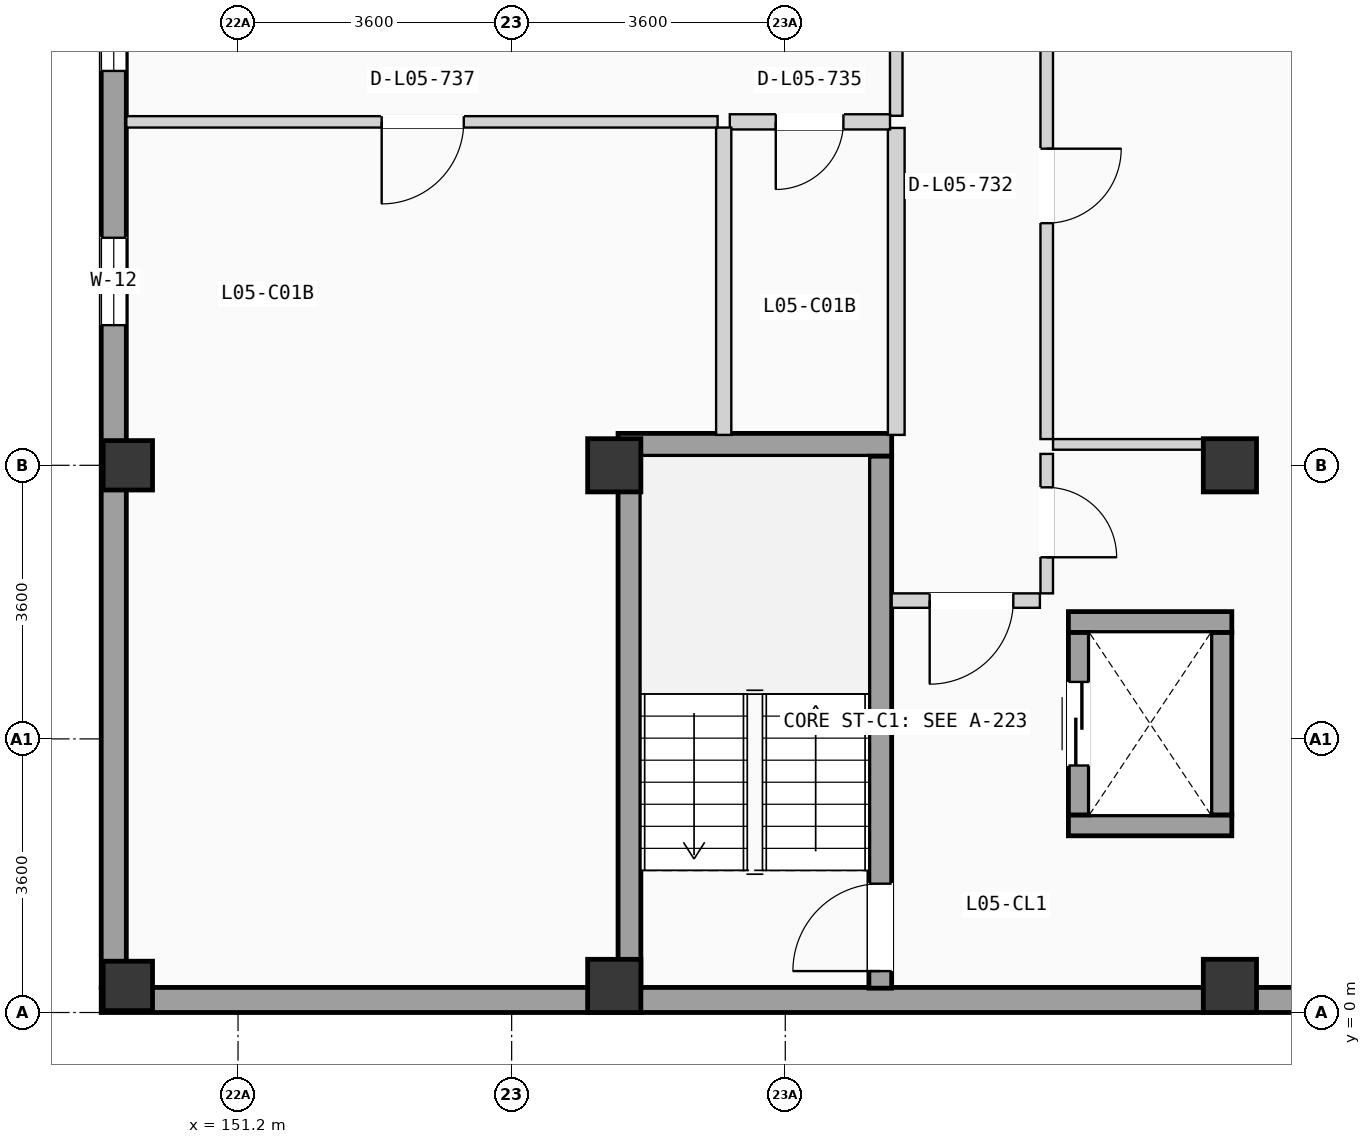
"""IFC4 building model, lengths in metres.
Left out: names, types, materials, properties, quantities, classifications, styles, units other than length and angle.
Written with IfcOpenShell. Run it as: python <this file> out.ifc"""

import sys

from ifc_helpers import new_model, si_unit, direction, frame, frame_2d, origin, origin_2d, place, context, subcontext, project, spatial, rectangle, extrude, element, fill, save


model = new_model("IFC4")
c1 = context("Model", 3, precision=1e-05, world=origin(), true_north=direction((0.0, 1.0)))
c2 = subcontext(c1, "Body", "Model", "MODEL_VIEW")
j1 = project(units=[si_unit("LENGTHUNIT", "METRE"), si_unit("PLANEANGLEUNIT", "RADIAN")], contexts=[c1])
p1 = place(None, origin())
s1 = spatial("IfcSite", under=j1, at=p1, CompositionType="ELEMENT")
p2 = place(p1, origin())
s2 = spatial("IfcBuilding", under=s1, at=p2, CompositionType="ELEMENT")
p3 = place(p2, frame((0.0, 0.0, 18.375)))
s3 = spatial("IfcBuildingStorey", under=s2, at=p3, CompositionType="ELEMENT", Elevation=18.375)
for number, where, z_axis, x_axis in (
    (1, (149.75, 0.35, 0.0), (0.0, 0.0, 1.0), (1.0, 0.0, 0.0)),
    (2, (149.75, 7.2, 0.0), (0.0, 0.0, 1.0), (1.0, 0.0, 0.0)),
):
    element("IfcColumn", number, at=place(p3, frame(where, z_axis=z_axis, x_axis=x_axis)), inside=s3, PredefinedType="COLUMN", context=c2, shape_type="SweptSolid", body=[
        extrude(rectangle(XDim=0.65, YDim=0.65, at=origin_2d()), origin(), (0.0, 0.0, 1.0), 3.15),
    ])
for number, where, z_axis, x_axis in (
    (3, (156.15, 0.35, 0.0), (0.0, 0.0, 1.0), (1.0, 0.0, 0.0)),
    (4, (156.15, 7.2, 0.0), (0.0, 0.0, 1.0), (1.0, 0.0, 0.0)),
    (5, (164.25, 0.35, 0.0), (0.0, 0.0, 1.0), (1.0, 0.0, 0.0)),
    (6, (164.25, 7.2, 0.0), (0.0, 0.0, 1.0), (1.0, 0.0, 0.0)),
):
    element("IfcColumn", number, at=place(p3, frame(where, z_axis=z_axis, x_axis=x_axis)), inside=s3, PredefinedType="COLUMN", context=c2, shape_type="SweptSolid", body=[
        extrude(rectangle(XDim=0.7, YDim=0.7, at=origin_2d()), origin(), (0.0, 0.0, 1.0), 3.15),
    ])
p4 = place(p3, frame((149.4, 0.165, 0.0), z_axis=(0.0, 0.0, 1.0), x_axis=(1.0, 0.0, 0.0)))
e7 = element("IfcWall", 7, at=p4, inside=s3, PredefinedType="SOLIDWALL", context=c2, shape_type="SweptSolid", body=[
    extrude(rectangle(XDim=21.6, YDim=0.33, at=frame_2d((10.8, 0.0))), origin(), (0.0, 0.0, 1.0), 2.89),
])
p5 = place(p3, frame((149.565, 0.33, 0.0), z_axis=(0.0, 0.0, 1.0), x_axis=(0.0, 1.0, 0.0)))
e8 = element("IfcWall", 8, at=p5, inside=s3, PredefinedType="SOLIDWALL", context=c2, shape_type="SweptSolid", body=[
    extrude(rectangle(XDim=49.74, YDim=0.33, at=frame_2d((24.87, 0.0))), origin(), (0.0, 0.0, 1.0), 2.89),
])
p6 = place(p5, frame((12.059, 0.0, 0.9)))
e9 = element("IfcOpeningElement", 9, at=p6, cuts=e8, PredefinedType="OPENING", context=c2, shape_type="SweptSolid", body=[
    extrude(rectangle(XDim=1.15, YDim=1.2, at=frame_2d((0.575, 0.6))), frame((0.0, 0.175, 0.0), z_axis=(0.0, -1.0, 0.0), x_axis=(1.0, 0.0, 0.0)), (0.0, 0.0, 1.0), 0.35),
])
p7 = place(p5, frame((8.714, 0.0, 0.855)))
e10 = element("IfcOpeningElement", 10, at=p7, cuts=e8, PredefinedType="OPENING", context=c2, shape_type="SweptSolid", body=[
    extrude(rectangle(XDim=1.15, YDim=1.35, at=frame_2d((0.575, 0.675))), frame((0.0, 0.175, 0.0), z_axis=(0.0, -1.0, 0.0), x_axis=(1.0, 0.0, 0.0)), (0.0, 0.0, 1.0), 0.35),
])
p8 = place(p5, frame((17.962, 0.0, 0.705)))
e11 = element("IfcOpeningElement", 11, at=p8, cuts=e8, PredefinedType="OPENING", context=c2, shape_type="SweptSolid", body=[
    extrude(rectangle(XDim=1.15, YDim=1.5, at=frame_2d((0.575, 0.75))), frame((0.0, 0.175, 0.0), z_axis=(0.0, -1.0, 0.0), x_axis=(1.0, 0.0, 0.0)), (0.0, 0.0, 1.0), 0.35),
])
p9 = place(p5, frame((31.115, 0.0, 0.555)))
e12 = element("IfcOpeningElement", 12, at=p9, cuts=e8, PredefinedType="OPENING", context=c2, shape_type="SweptSolid", body=[
    extrude(rectangle(XDim=1.15, YDim=1.65, at=frame_2d((0.575, 0.825))), frame((0.0, 0.175, 0.0), z_axis=(0.0, -1.0, 0.0), x_axis=(1.0, 0.0, 0.0)), (0.0, 0.0, 1.0), 0.35),
])
p10 = place(p5, frame((23.992, 0.0, 0.85)))
e13 = element("IfcOpeningElement", 13, at=p10, cuts=e8, PredefinedType="OPENING", context=c2, shape_type="SweptSolid", body=[
    extrude(rectangle(XDim=0.95, YDim=1.2, at=frame_2d((0.475, 0.6))), frame((0.0, 0.175, 0.0), z_axis=(0.0, -1.0, 0.0), x_axis=(1.0, 0.0, 0.0)), (0.0, 0.0, 1.0), 0.35),
])
p11 = place(p5, frame((38.58, 0.0, 0.9)))
e14 = element("IfcOpeningElement", 14, at=p11, cuts=e8, PredefinedType="OPENING", context=c2, shape_type="SweptSolid", body=[
    extrude(rectangle(XDim=1.25, YDim=1.2, at=frame_2d((0.625, 0.6))), frame((0.0, 0.175, 0.0), z_axis=(0.0, -1.0, 0.0), x_axis=(1.0, 0.0, 0.0)), (0.0, 0.0, 1.0), 0.35),
])
p12 = place(p3, frame((156.2, 7.47, 0.0), z_axis=(0.0, 0.0, 1.0), x_axis=(1.0, 0.0, 0.0)))
e15 = element("IfcWall", 15, at=p12, inside=s3, PredefinedType="SHEAR", context=c2, shape_type="SweptSolid", body=[
    extrude(rectangle(XDim=3.6, YDim=0.3, at=frame_2d((1.8, 0.0))), origin(), (0.0, 0.0, 1.0), 2.89),
])
p13 = place(p3, frame((156.35, 0.32, 0.0), z_axis=(0.0, 0.0, 1.0), x_axis=(0.0, 1.0, 0.0)))
e16 = element("IfcWall", 16, at=p13, inside=s3, PredefinedType="SHEAR", context=c2, shape_type="SweptSolid", body=[
    extrude(rectangle(XDim=7.0, YDim=0.3, at=frame_2d((3.5, 0.0))), origin(), (0.0, 0.0, 1.0), 2.89),
])
p14 = place(p3, frame((159.65, 0.32, 0.0), z_axis=(0.0, 0.0, 1.0), x_axis=(0.0, 1.0, 0.0)))
e17 = element("IfcWall", 17, at=p14, inside=s3, PredefinedType="SHEAR", context=c2, shape_type="SweptSolid", body=[
    extrude(rectangle(XDim=7.0, YDim=0.3, at=frame_2d((3.5, 0.0))), origin(), (0.0, 0.0, 1.0), 2.89),
])
p15 = place(p14, frame((0.225, 0.0, 0.0)))
e18 = element("IfcOpeningElement", 18, at=p15, cuts=e17, PredefinedType="OPENING", context=c2, shape_type="SweptSolid", body=[
    extrude(rectangle(XDim=1.15, YDim=2.12, at=frame_2d((0.575, 1.06))), frame((0.0, 0.16, 0.0), z_axis=(0.0, -1.0, 0.0), x_axis=(1.0, 0.0, 0.0)), (0.0, 0.0, 1.0), 0.32),
])
for number, where, z_axis, x_axis in (
    (19, (162.125, 2.462, 0.0), (0.0, 0.0, 1.0), (1.0, 0.0, 0.0)),
    (20, (162.125, 5.137, 0.0), (0.0, 0.0, 1.0), (1.0, 0.0, 0.0)),
):
    element("IfcWall", number, at=place(p3, frame(where, z_axis=z_axis, x_axis=x_axis)), inside=s3, PredefinedType="SHEAR", context=c2, shape_type="SweptSolid", body=[
        extrude(rectangle(XDim=2.15, YDim=0.275, at=frame_2d((1.075, 0.0))), origin(), (0.0, 0.0, 1.0), 2.89),
    ])
p16 = place(p3, frame((162.262, 2.6, 0.0), z_axis=(0.0, 0.0, 1.0), x_axis=(0.0, 1.0, 0.0)))
e21 = element("IfcWall", 21, at=p16, inside=s3, PredefinedType="SHEAR", context=c2, shape_type="SweptSolid", body=[
    extrude(rectangle(XDim=2.4, YDim=0.275, at=frame_2d((1.2, 0.0))), origin(), (0.0, 0.0, 1.0), 2.89),
])
p17 = place(p16, frame((0.65, 0.0, 0.0)))
e22 = element("IfcOpeningElement", 22, at=p17, cuts=e21, PredefinedType="OPENING", context=c2, shape_type="SweptSolid", body=[
    extrude(rectangle(XDim=1.1, YDim=2.15, at=frame_2d((0.55, 1.075))), frame((0.0, 0.147, 0.0), z_axis=(0.0, -1.0, 0.0), x_axis=(1.0, 0.0, 0.0)), (0.0, 0.0, 1.0), 0.295),
])
p18 = place(p3, frame((164.137, 2.6, 0.0), z_axis=(0.0, 0.0, 1.0), x_axis=(0.0, 1.0, 0.0)))
e23 = element("IfcWall", 23, at=p18, inside=s3, PredefinedType="SHEAR", context=c2, shape_type="SweptSolid", body=[
    extrude(rectangle(XDim=2.4, YDim=0.275, at=frame_2d((1.2, 0.0))), origin(), (0.0, 0.0, 1.0), 2.89),
])
p19 = place(p3, frame((159.8, 5.42, 0.0), z_axis=(0.0, 0.0, 1.0), x_axis=(1.0, 0.0, 0.0)))
e24 = element("IfcWall", 24, at=p19, inside=s3, PredefinedType="PARTITIONING", context=c2, shape_type="SweptSolid", body=[
    extrude(rectangle(XDim=1.95, YDim=0.19, at=frame_2d((0.975, 0.0))), origin(), (0.0, 0.0, 1.0), 2.87),
])
p20 = place(p19, frame((0.5, 0.0, 0.0)))
e25 = element("IfcOpeningElement", 25, at=p20, cuts=e24, PredefinedType="OPENING", context=c2, shape_type="SweptSolid", body=[
    extrude(rectangle(XDim=1.1, YDim=2.12, at=frame_2d((0.55, 1.06))), frame((0.0, 0.105, 0.0), z_axis=(0.0, -1.0, 0.0), x_axis=(1.0, 0.0, 0.0)), (0.0, 0.0, 1.0), 0.21),
])
p21 = place(p3, frame((161.84, 5.515, 0.0), z_axis=(0.0, 0.0, 1.0), x_axis=(0.0, 1.0, 0.0)))
e26 = element("IfcWall", 26, at=p21, inside=s3, PredefinedType="PARTITIONING", context=c2, shape_type="SweptSolid", body=[
    extrude(rectangle(XDim=1.835, YDim=0.165, at=frame_2d((0.917, 0.0))), origin(), (0.0, 0.0, 1.0), 2.87),
])
p22 = place(p21, frame((0.475, 0.0, 0.0)))
e27 = element("IfcOpeningElement", 27, at=p22, cuts=e26, PredefinedType="OPENING", context=c2, shape_type="SweptSolid", body=[
    extrude(rectangle(XDim=0.92, YDim=2.04, at=frame_2d((0.46, 1.02))), frame((0.0, 0.093, 0.0), z_axis=(0.0, -1.0, 0.0), x_axis=(1.0, 0.0, 0.0)), (0.0, 0.0, 1.0), 0.185),
])
p23 = place(p3, frame((161.923, 7.475, 0.0), z_axis=(0.0, 0.0, 1.0), x_axis=(1.0, 0.0, 0.0)))
e28 = element("IfcWall", 28, at=p23, inside=s3, PredefinedType="PARTITIONING", context=c2, shape_type="SweptSolid", body=[
    extrude(rectangle(XDim=2.127, YDim=0.14, at=frame_2d((1.063, 0.0))), origin(), (0.0, 0.0, 1.0), 2.87),
])
p24 = place(p3, frame((159.86, 11.799, 0.0), z_axis=(0.0, 0.0, 1.0), x_axis=(0.0, 1.0, 0.0)))
e29 = element("IfcWall", 29, at=p24, inside=s3, PredefinedType="PARTITIONING", context=c2, shape_type="SweptSolid", body=[
    extrude(rectangle(XDim=4.888, YDim=0.165, at=frame_2d((2.444, 0.0))), origin(), (0.0, 0.0, 1.0), 2.87),
])
p25 = place(p24, frame((1.939, 0.0, 0.0)))
e30 = element("IfcOpeningElement", 30, at=p25, cuts=e29, PredefinedType="OPENING", context=c2, shape_type="SweptSolid", body=[
    extrude(rectangle(XDim=1.01, YDim=2.11, at=frame_2d((0.505, 1.055))), frame((0.0, 0.093, 0.0), z_axis=(0.0, -1.0, 0.0), x_axis=(1.0, 0.0, 0.0)), (0.0, 0.0, 1.0), 0.185),
])
p26 = place(p3, frame((159.86, 7.6, 0.0), z_axis=(0.0, 0.0, 1.0), x_axis=(0.0, 1.0, 0.0)))
e31 = element("IfcWall", 31, at=p26, inside=s3, PredefinedType="PLUMBINGWALL", context=c2, shape_type="SweptSolid", body=[
    extrude(rectangle(XDim=4.039, YDim=0.22, at=frame_2d((2.02, 0.0))), origin(), (0.0, 0.0, 1.0), 2.87),
])
p27 = place(p3, frame((161.84, 7.545, 0.0), z_axis=(0.0, 0.0, 1.0), x_axis=(0.0, 1.0, 0.0)))
e32 = element("IfcWall", 32, at=p27, inside=s3, PredefinedType="PARTITIONING", context=c2, shape_type="SweptSolid", body=[
    extrude(rectangle(XDim=6.608, YDim=0.165, at=frame_2d((3.304, 0.0))), origin(), (0.0, 0.0, 1.0), 2.87),
])
p28 = place(p27, frame((2.841, 0.0, 0.0)))
e33 = element("IfcOpeningElement", 33, at=p28, cuts=e32, PredefinedType="OPENING", context=c2, shape_type="SweptSolid", body=[
    extrude(rectangle(XDim=0.98, YDim=2.08, at=frame_2d((0.49, 1.04))), frame((0.0, 0.093, 0.0), z_axis=(0.0, -1.0, 0.0), x_axis=(1.0, 0.0, 0.0)), (0.0, 0.0, 1.0), 0.185),
])
p29 = place(p3, frame((157.67, 11.719, 0.0), z_axis=(0.0, 0.0, 1.0), x_axis=(1.0, 0.0, 0.0)))
e34 = element("IfcWall", 34, at=p29, inside=s3, PredefinedType="PLUMBINGWALL", context=c2, shape_type="SweptSolid", body=[
    extrude(rectangle(XDim=2.108, YDim=0.2, at=frame_2d((1.054, 0.0))), origin(), (0.0, 0.0, 1.0), 2.87),
])
p30 = place(p29, frame((0.605, 0.0, 0.0)))
e35 = element("IfcOpeningElement", 35, at=p30, cuts=e34, PredefinedType="OPENING", context=c2, shape_type="SweptSolid", body=[
    extrude(rectangle(XDim=0.89, YDim=2.03, at=frame_2d((0.445, 1.015))), frame((0.0, 0.11, 0.0), z_axis=(0.0, -1.0, 0.0), x_axis=(1.0, 0.0, 0.0)), (0.0, 0.0, 1.0), 0.22),
])
p31 = place(p3, frame((149.73, 11.719, 0.0), z_axis=(0.0, 0.0, 1.0), x_axis=(1.0, 0.0, 0.0)))
e36 = element("IfcWall", 36, at=p31, inside=s3, PredefinedType="PARTITIONING", context=c2, shape_type="SweptSolid", body=[
    extrude(rectangle(XDim=7.78, YDim=0.15, at=frame_2d((3.89, 0.0))), origin(), (0.0, 0.0, 1.0), 2.87),
])
p32 = place(p31, frame((3.36, 0.0, 0.0)))
e37 = element("IfcOpeningElement", 37, at=p32, cuts=e36, PredefinedType="OPENING", context=c2, shape_type="SweptSolid", body=[
    extrude(rectangle(XDim=1.08, YDim=2.1, at=frame_2d((0.54, 1.05))), frame((0.0, 0.085, 0.0), z_axis=(0.0, -1.0, 0.0), x_axis=(1.0, 0.0, 0.0)), (0.0, 0.0, 1.0), 0.17),
])
p33 = place(p3, frame((157.59, 7.6, 0.0), z_axis=(0.0, 0.0, 1.0), x_axis=(0.0, 1.0, 0.0)))
e38 = element("IfcWall", 38, at=p33, inside=s3, PredefinedType="PLUMBINGWALL", context=c2, shape_type="SweptSolid", body=[
    extrude(rectangle(XDim=4.044, YDim=0.2, at=frame_2d((2.022, 0.0))), origin(), (0.0, 0.0, 1.0), 2.87),
])
p34 = place(p6, origin())
e39 = element("IfcWindow", 39, at=p34, inside=s3, PartitioningType="SINGLE_PANEL", PredefinedType="WINDOW", context=c2, shape_type="SweptSolid", body=[
    extrude(rectangle(XDim=1.15, YDim=1.2, at=frame_2d((0.575, 0.6))), frame((0.0, 0.03, 0.0), z_axis=(0.0, -1.0, 0.0), x_axis=(1.0, 0.0, 0.0)), (0.0, 0.0, 1.0), 0.06),
])
fill(e9, e39)
p35 = place(p7, origin())
e40 = element("IfcWindow", 40, at=p35, inside=s3, PartitioningType="SINGLE_PANEL", PredefinedType="WINDOW", context=c2, shape_type="SweptSolid", body=[
    extrude(rectangle(XDim=1.15, YDim=1.35, at=frame_2d((0.575, 0.675))), frame((0.0, 0.03, 0.0), z_axis=(0.0, -1.0, 0.0), x_axis=(1.0, 0.0, 0.0)), (0.0, 0.0, 1.0), 0.06),
])
fill(e10, e40)
p36 = place(p15, origin())
e41 = element("IfcDoor", 41, at=p36, inside=s3, OperationType="SINGLE_SWING_LEFT", PredefinedType="DOOR", context=c2, shape_type="SweptSolid", body=[
    extrude(rectangle(XDim=1.15, YDim=2.12, at=frame_2d((0.575, 1.06))), frame((0.0, 0.025, 0.0), z_axis=(0.0, -1.0, 0.0), x_axis=(1.0, 0.0, 0.0)), (0.0, 0.0, 1.0), 0.05),
])
fill(e18, e41)
p37 = place(p17, origin())
e42 = element("IfcDoor", 42, at=p37, inside=s3, OperationType="SLIDING_TO_LEFT", PredefinedType="DOOR", context=c2, shape_type="SweptSolid", body=[
    extrude(rectangle(XDim=1.1, YDim=2.15, at=frame_2d((0.55, 1.075))), frame((0.0, 0.025, 0.0), z_axis=(0.0, -1.0, 0.0), x_axis=(1.0, 0.0, 0.0)), (0.0, 0.0, 1.0), 0.05),
])
fill(e22, e42)
p38 = place(p20, frame((1.1, 0.0, 0.0), z_axis=(0.0, 0.0, 1.0), x_axis=(-1.0, 0.0, 0.0)))
e43 = element("IfcDoor", 43, at=p38, inside=s3, OperationType="SINGLE_SWING_LEFT", PredefinedType="DOOR", context=c2, shape_type="SweptSolid", body=[
    extrude(rectangle(XDim=1.1, YDim=2.12, at=frame_2d((0.55, 1.06))), frame((0.0, 0.025, 0.0), z_axis=(0.0, -1.0, 0.0), x_axis=(1.0, 0.0, 0.0)), (0.0, 0.0, 1.0), 0.05),
])
fill(e25, e43)
p39 = place(p22, frame((0.92, 0.0, 0.0), z_axis=(0.0, 0.0, 1.0), x_axis=(-1.0, 0.0, 0.0)))
e44 = element("IfcDoor", 44, at=p39, inside=s3, OperationType="SINGLE_SWING_LEFT", PredefinedType="DOOR", context=c2, shape_type="SweptSolid", body=[
    extrude(rectangle(XDim=0.92, YDim=2.04, at=frame_2d((0.46, 1.02))), frame((0.0, 0.025, 0.0), z_axis=(0.0, -1.0, 0.0), x_axis=(1.0, 0.0, 0.0)), (0.0, 0.0, 1.0), 0.05),
])
fill(e27, e44)
p40 = place(p28, frame((0.98, 0.0, 0.0), z_axis=(0.0, 0.0, 1.0), x_axis=(-1.0, 0.0, 0.0)))
e45 = element("IfcDoor", 45, at=p40, inside=s3, OperationType="SINGLE_SWING_RIGHT", PredefinedType="DOOR", context=c2, shape_type="SweptSolid", body=[
    extrude(rectangle(XDim=0.98, YDim=2.08, at=frame_2d((0.49, 1.04))), frame((0.0, 0.025, 0.0), z_axis=(0.0, -1.0, 0.0), x_axis=(1.0, 0.0, 0.0)), (0.0, 0.0, 1.0), 0.05),
])
fill(e33, e45)
p41 = place(p30, frame((0.89, 0.0, 0.0), z_axis=(0.0, 0.0, 1.0), x_axis=(-1.0, 0.0, 0.0)))
e46 = element("IfcDoor", 46, at=p41, inside=s3, OperationType="SINGLE_SWING_LEFT", PredefinedType="DOOR", context=c2, shape_type="SweptSolid", body=[
    extrude(rectangle(XDim=0.89, YDim=2.03, at=frame_2d((0.445, 1.015))), frame((0.0, 0.025, 0.0), z_axis=(0.0, -1.0, 0.0), x_axis=(1.0, 0.0, 0.0)), (0.0, 0.0, 1.0), 0.05),
])
fill(e35, e46)
p42 = place(p32, frame((1.08, 0.0, 0.0), z_axis=(0.0, 0.0, 1.0), x_axis=(-1.0, 0.0, 0.0)))
e47 = element("IfcDoor", 47, at=p42, inside=s3, OperationType="SINGLE_SWING_LEFT", PredefinedType="DOOR", context=c2, shape_type="SweptSolid", body=[
    extrude(rectangle(XDim=1.08, YDim=2.1, at=frame_2d((0.54, 1.05))), frame((0.0, 0.025, 0.0), z_axis=(0.0, -1.0, 0.0), x_axis=(1.0, 0.0, 0.0)), (0.0, 0.0, 1.0), 0.05),
])
fill(e37, e47)
save(model, sys.argv[1])
